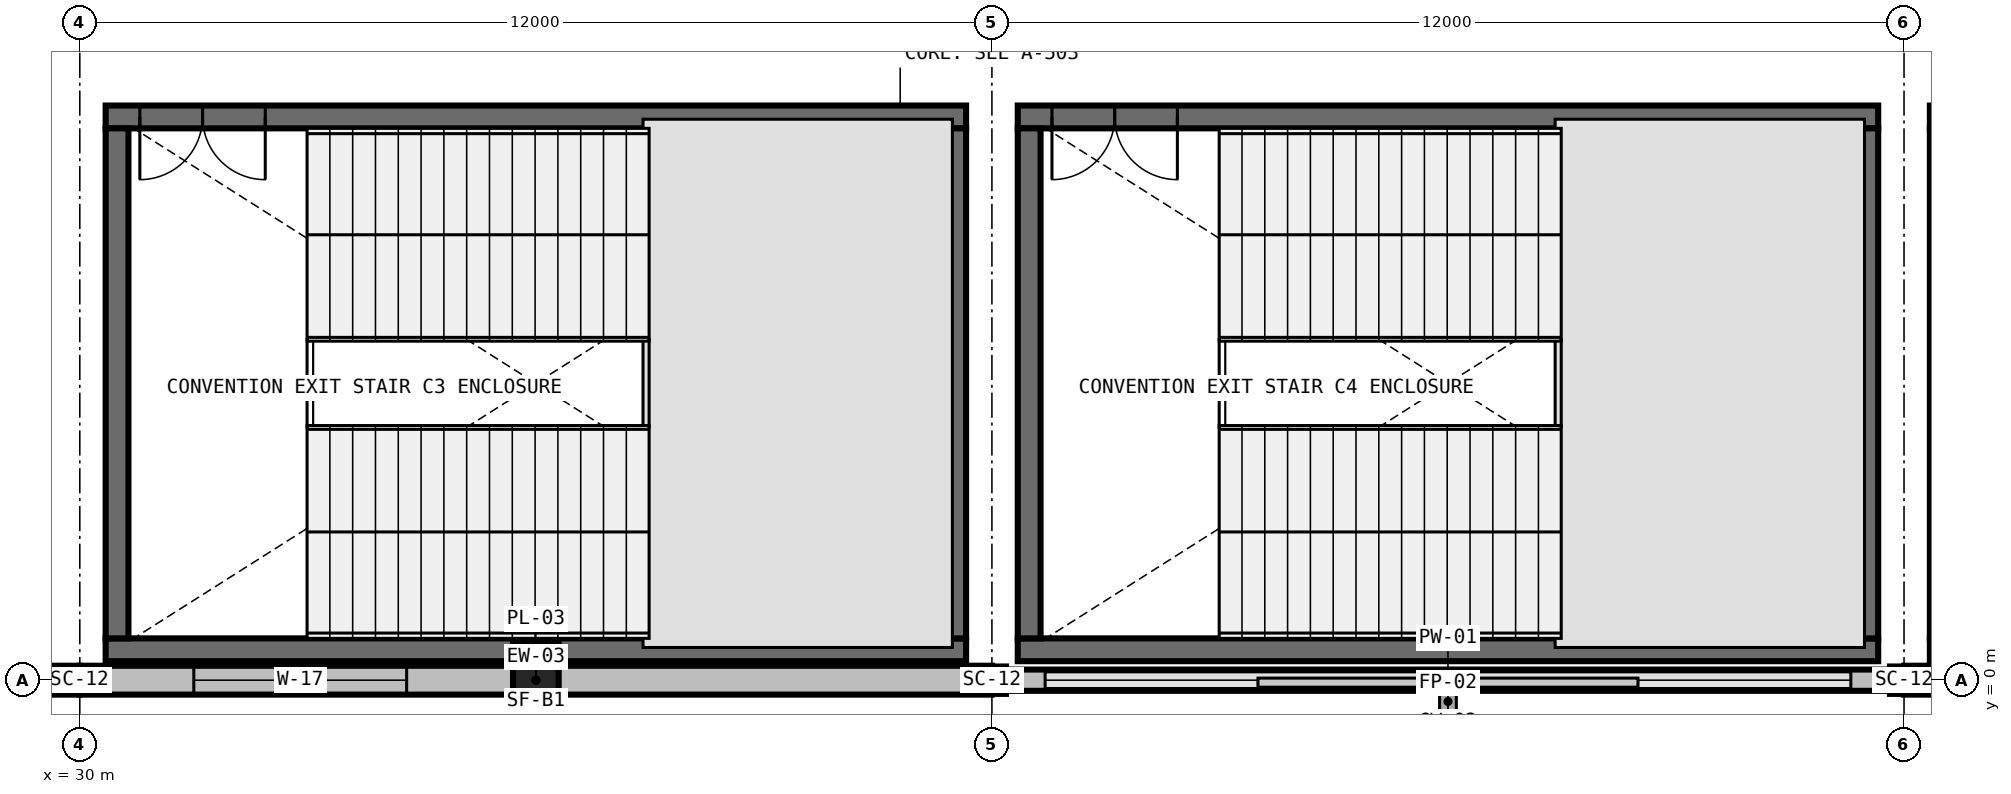
"""IFC4 building model, lengths in metres.
Left out: names, types, materials, properties, quantities, classifications, styles, units other than length and angle.
Written with IfcOpenShell. Run it as: python <this file> out.ifc"""

import sys

from ifc_helpers import new_model, si_unit, direction, frame, frame_2d, origin, origin_2d, place, context, subcontext, project, spatial, rectangle, i_section, extrude, element, fill, save


model = new_model("IFC4")
c1 = context("Model", 3, precision=1e-05, world=origin(), true_north=direction((0.0, 1.0)))
c2 = subcontext(c1, "Body", "Model", "MODEL_VIEW")
j1 = project(units=[si_unit("LENGTHUNIT", "METRE"), si_unit("PLANEANGLEUNIT", "RADIAN")], contexts=[c1])
p1 = place(None, origin())
s1 = spatial("IfcSite", under=j1, at=p1, CompositionType="ELEMENT")
p2 = place(p1, origin())
s2 = spatial("IfcBuilding", under=s1, at=p2, CompositionType="ELEMENT")
p3 = place(p2, frame((0.0, 0.0, 18.0)))
s3 = spatial("IfcBuildingStorey", under=s2, at=p3, CompositionType="ELEMENT", Elevation=18.0)
for number, where, z_axis, x_axis in (
    (1, (30.0, 0.0, 0.0), (0.0, 0.0, 1.0), (1.0, 0.0, 0.0)),
    (2, (42.0, 0.0, 0.0), (0.0, 0.0, 1.0), (1.0, 0.0, 0.0)),
    (3, (54.0, 0.0, 0.0), (0.0, 0.0, 1.0), (1.0, 0.0, 0.0)),
):
    element("IfcColumn", number, at=place(p3, frame(where, z_axis=z_axis, x_axis=x_axis)), inside=s3, PredefinedType="COLUMN", context=c2, shape_type="SweptSolid", body=[
        extrude(i_section(OverallWidth=0.37, OverallDepth=0.36, WebThickness=0.012, FlangeThickness=0.02, FilletRadius=0.031, at=origin_2d()), origin(), (0.0, 0.0, 1.0), 5.4),
    ])
p4 = place(p3, frame((36.0, 0.0, 0.0), z_axis=(0.0, 0.0, 1.0), x_axis=(1.0, 0.0, 0.0)))
e4 = element("IfcColumn", 4, at=p4, inside=s3, PredefinedType="PILASTER", context=c2, shape_type="SweptSolid", body=[
    extrude(rectangle(XDim=0.6, YDim=1.0, at=origin_2d()), origin(), (0.0, 0.0, 1.0), 5.4),
])
p5 = place(p3, frame((41.66, 0.4, 0.0), z_axis=(0.0, 0.0, 1.0), x_axis=(-1.0, 0.0, 0.0)))
e5 = element("IfcWall", 5, at=p5, inside=s3, PredefinedType="SHEAR", context=c2, shape_type="SweptSolid", body=[
    extrude(rectangle(XDim=11.32, YDim=0.3, at=frame_2d((5.66, 0.0))), origin(), (0.0, 0.0, 1.0), 5.4),
])
p6 = place(p3, frame((41.66, 7.41, 0.0), z_axis=(0.0, 0.0, 1.0), x_axis=(-1.0, 0.0, 0.0)))
e6 = element("IfcWall", 6, at=p6, inside=s3, PredefinedType="SHEAR", context=c2, shape_type="SweptSolid", body=[
    extrude(rectangle(XDim=11.32, YDim=0.3, at=frame_2d((5.66, 0.0))), origin(), (0.0, 0.0, 1.0), 5.4),
])
p7 = place(p6, frame((9.22, 0.0, 0.0)))
e7 = element("IfcOpeningElement", 7, at=p7, cuts=e6, PredefinedType="OPENING", context=c2, shape_type="SweptSolid", body=[
    extrude(rectangle(XDim=1.65, YDim=2.25, at=frame_2d((0.825, 1.125))), frame((0.0, 0.165, 0.0), z_axis=(0.0, -1.0, 0.0), x_axis=(1.0, 0.0, 0.0)), (0.0, 0.0, 1.0), 0.33),
])
for number, where, z_axis, x_axis in (
    (8, (30.49, 7.26, 0.0), (0.0, 0.0, 1.0), (0.0, -1.0, 0.0)),
    (9, (41.51, 0.55, 0.0), (0.0, 0.0, 1.0), (0.0, 1.0, 0.0)),
):
    element("IfcWall", number, at=place(p3, frame(where, z_axis=z_axis, x_axis=x_axis)), inside=s3, PredefinedType="SHEAR", context=c2, shape_type="SweptSolid", body=[
        extrude(rectangle(XDim=6.71, YDim=0.3, at=frame_2d((3.355, 0.0))), origin(), (0.0, 0.0, 1.0), 5.4),
    ])
p8 = place(p3, frame((53.66, 0.4, 0.0), z_axis=(0.0, 0.0, 1.0), x_axis=(-1.0, 0.0, 0.0)))
e10 = element("IfcWall", 10, at=p8, inside=s3, PredefinedType="SHEAR", context=c2, shape_type="SweptSolid", body=[
    extrude(rectangle(XDim=11.32, YDim=0.3, at=frame_2d((5.66, 0.0))), origin(), (0.0, 0.0, 1.0), 5.4),
])
p9 = place(p3, frame((53.66, 7.41, 0.0), z_axis=(0.0, 0.0, 1.0), x_axis=(-1.0, 0.0, 0.0)))
e11 = element("IfcWall", 11, at=p9, inside=s3, PredefinedType="SHEAR", context=c2, shape_type="SweptSolid", body=[
    extrude(rectangle(XDim=11.32, YDim=0.3, at=frame_2d((5.66, 0.0))), origin(), (0.0, 0.0, 1.0), 5.4),
])
p10 = place(p9, frame((9.22, 0.0, 0.0)))
e12 = element("IfcOpeningElement", 12, at=p10, cuts=e11, PredefinedType="OPENING", context=c2, shape_type="SweptSolid", body=[
    extrude(rectangle(XDim=1.65, YDim=2.25, at=frame_2d((0.825, 1.125))), frame((0.0, 0.165, 0.0), z_axis=(0.0, -1.0, 0.0), x_axis=(1.0, 0.0, 0.0)), (0.0, 0.0, 1.0), 0.33),
])
for number, where, z_axis, x_axis in (
    (13, (42.49, 7.26, 0.0), (0.0, 0.0, 1.0), (0.0, -1.0, 0.0)),
    (14, (53.51, 0.55, 0.0), (0.0, 0.0, 1.0), (0.0, 1.0, 0.0)),
):
    element("IfcWall", number, at=place(p3, frame(where, z_axis=z_axis, x_axis=x_axis)), inside=s3, PredefinedType="SHEAR", context=c2, shape_type="SweptSolid", body=[
        extrude(rectangle(XDim=6.71, YDim=0.3, at=frame_2d((3.355, 0.0))), origin(), (0.0, 0.0, 1.0), 5.4),
    ])
p11 = place(p3, frame((65.66, 0.4, 0.0), z_axis=(0.0, 0.0, 1.0), x_axis=(-1.0, 0.0, 0.0)))
e15 = element("IfcWall", 15, at=p11, inside=s3, PredefinedType="SHEAR", context=c2, shape_type="SweptSolid", body=[
    extrude(rectangle(XDim=11.32, YDim=0.3, at=frame_2d((5.66, 0.0))), origin(), (0.0, 0.0, 1.0), 5.4),
])
p12 = place(p3, frame((65.66, 7.41, 0.0), z_axis=(0.0, 0.0, 1.0), x_axis=(-1.0, 0.0, 0.0)))
e16 = element("IfcWall", 16, at=p12, inside=s3, PredefinedType="SHEAR", context=c2, shape_type="SweptSolid", body=[
    extrude(rectangle(XDim=11.32, YDim=0.3, at=frame_2d((5.66, 0.0))), origin(), (0.0, 0.0, 1.0), 5.4),
])
p13 = place(p12, frame((9.22, 0.0, 0.0)))
e17 = element("IfcOpeningElement", 17, at=p13, cuts=e16, PredefinedType="OPENING", context=c2, shape_type="SweptSolid", body=[
    extrude(rectangle(XDim=1.65, YDim=2.25, at=frame_2d((0.825, 1.125))), frame((0.0, 0.165, 0.0), z_axis=(0.0, -1.0, 0.0), x_axis=(1.0, 0.0, 0.0)), (0.0, 0.0, 1.0), 0.33),
])
p14 = place(p3, frame((54.49, 7.26, 0.0), z_axis=(0.0, 0.0, 1.0), x_axis=(0.0, -1.0, 0.0)))
e18 = element("IfcWall", 18, at=p14, inside=s3, PredefinedType="SHEAR", context=c2, shape_type="SweptSolid", body=[
    extrude(rectangle(XDim=6.71, YDim=0.3, at=frame_2d((3.355, 0.0))), origin(), (0.0, 0.0, 1.0), 5.4),
])
p15 = place(p3, frame((24.0, 0.0, 0.0), z_axis=(0.0, 0.0, 1.0), x_axis=(1.0, 0.0, 0.0)))
e19 = element("IfcWall", 19, at=p15, inside=s3, PredefinedType="STANDARD", context=c2, shape_type="SweptSolid", body=[
    extrude(rectangle(XDim=6.0, YDim=0.38, at=frame_2d((3.0, 0.0))), origin(), (0.0, 0.0, 1.0), 4.176),
])
p16 = place(p3, frame((30.0, 0.0, 0.0), z_axis=(0.0, 0.0, 1.0), x_axis=(1.0, 0.0, 0.0)))
e20 = element("IfcWall", 20, at=p16, inside=s3, PredefinedType="STANDARD", context=c2, shape_type="SweptSolid", body=[
    extrude(rectangle(XDim=12.0, YDim=0.38, at=frame_2d((6.0, 0.0))), origin(), (0.0, 0.0, 1.0), 4.176),
])
p17 = place(p16, frame((1.5, 0.0, 0.85)))
e21 = element("IfcOpeningElement", 21, at=p17, cuts=e20, PredefinedType="OPENING", context=c2, shape_type="SweptSolid", body=[
    extrude(rectangle(XDim=2.8, YDim=2.4, at=frame_2d((1.4, 1.2))), frame((0.0, 0.205, 0.0), z_axis=(0.0, -1.0, 0.0), x_axis=(1.0, 0.0, 0.0)), (0.0, 0.0, 1.0), 0.41),
])
p18 = place(p3, frame((42.0, 0.0, 0.0), z_axis=(0.0, 0.0, 1.0), x_axis=(1.0, 0.0, 0.0)))
e22 = element("IfcWall", 22, at=p18, inside=s3, PredefinedType="PARAPET", context=c2, shape_type="SweptSolid", body=[
    extrude(rectangle(XDim=12.0, YDim=0.28, at=frame_2d((6.0, 0.0))), origin(), (0.0, 0.0, 1.0), 0.2),
])
p19 = place(p3, frame((54.0, 0.0, 0.0), z_axis=(0.0, 0.0, 1.0), x_axis=(1.0, 0.0, 0.0)))
e23 = element("IfcWall", 23, at=p19, inside=s3, PredefinedType="STANDARD", context=c2, shape_type="SweptSolid", body=[
    extrude(rectangle(XDim=12.0, YDim=0.38, at=frame_2d((6.0, 0.0))), origin(), (0.0, 0.0, 1.0), 4.176),
])
p20 = place(p19, frame((1.5, 0.0, 0.85)))
e24 = element("IfcOpeningElement", 24, at=p20, cuts=e23, PredefinedType="OPENING", context=c2, shape_type="SweptSolid", body=[
    extrude(rectangle(XDim=2.2, YDim=1.95, at=frame_2d((1.1, 0.975))), frame((0.0, 0.205, 0.0), z_axis=(0.0, -1.0, 0.0), x_axis=(1.0, 0.0, 0.0)), (0.0, 0.0, 1.0), 0.41),
])
p21 = place(p7, origin())
e25 = element("IfcDoor", 25, at=p21, inside=s3, OperationType="DOUBLE_DOOR_SINGLE_SWING", PredefinedType="DOOR", context=c2, shape_type="SweptSolid", body=[
    extrude(rectangle(XDim=1.65, YDim=2.25, at=frame_2d((0.825, 1.125))), frame((0.0, 0.025, 0.0), z_axis=(0.0, -1.0, 0.0), x_axis=(1.0, 0.0, 0.0)), (0.0, 0.0, 1.0), 0.05),
])
fill(e7, e25)
p22 = place(p10, origin())
e26 = element("IfcDoor", 26, at=p22, inside=s3, OperationType="DOUBLE_DOOR_SINGLE_SWING", PredefinedType="DOOR", context=c2, shape_type="SweptSolid", body=[
    extrude(rectangle(XDim=1.65, YDim=2.25, at=frame_2d((0.825, 1.125))), frame((0.0, 0.025, 0.0), z_axis=(0.0, -1.0, 0.0), x_axis=(1.0, 0.0, 0.0)), (0.0, 0.0, 1.0), 0.05),
])
fill(e12, e26)
p23 = place(p17, origin())
e27 = element("IfcWindow", 27, at=p23, inside=s3, PartitioningType="DOUBLE_PANEL_VERTICAL", PredefinedType="WINDOW", context=c2, shape_type="SweptSolid", body=[
    extrude(rectangle(XDim=2.8, YDim=2.4, at=frame_2d((1.4, 1.2))), frame((0.0, 0.03, 0.0), z_axis=(0.0, -1.0, 0.0), x_axis=(1.0, 0.0, 0.0)), (0.0, 0.0, 1.0), 0.06),
])
fill(e21, e27)
save(model, sys.argv[1])
